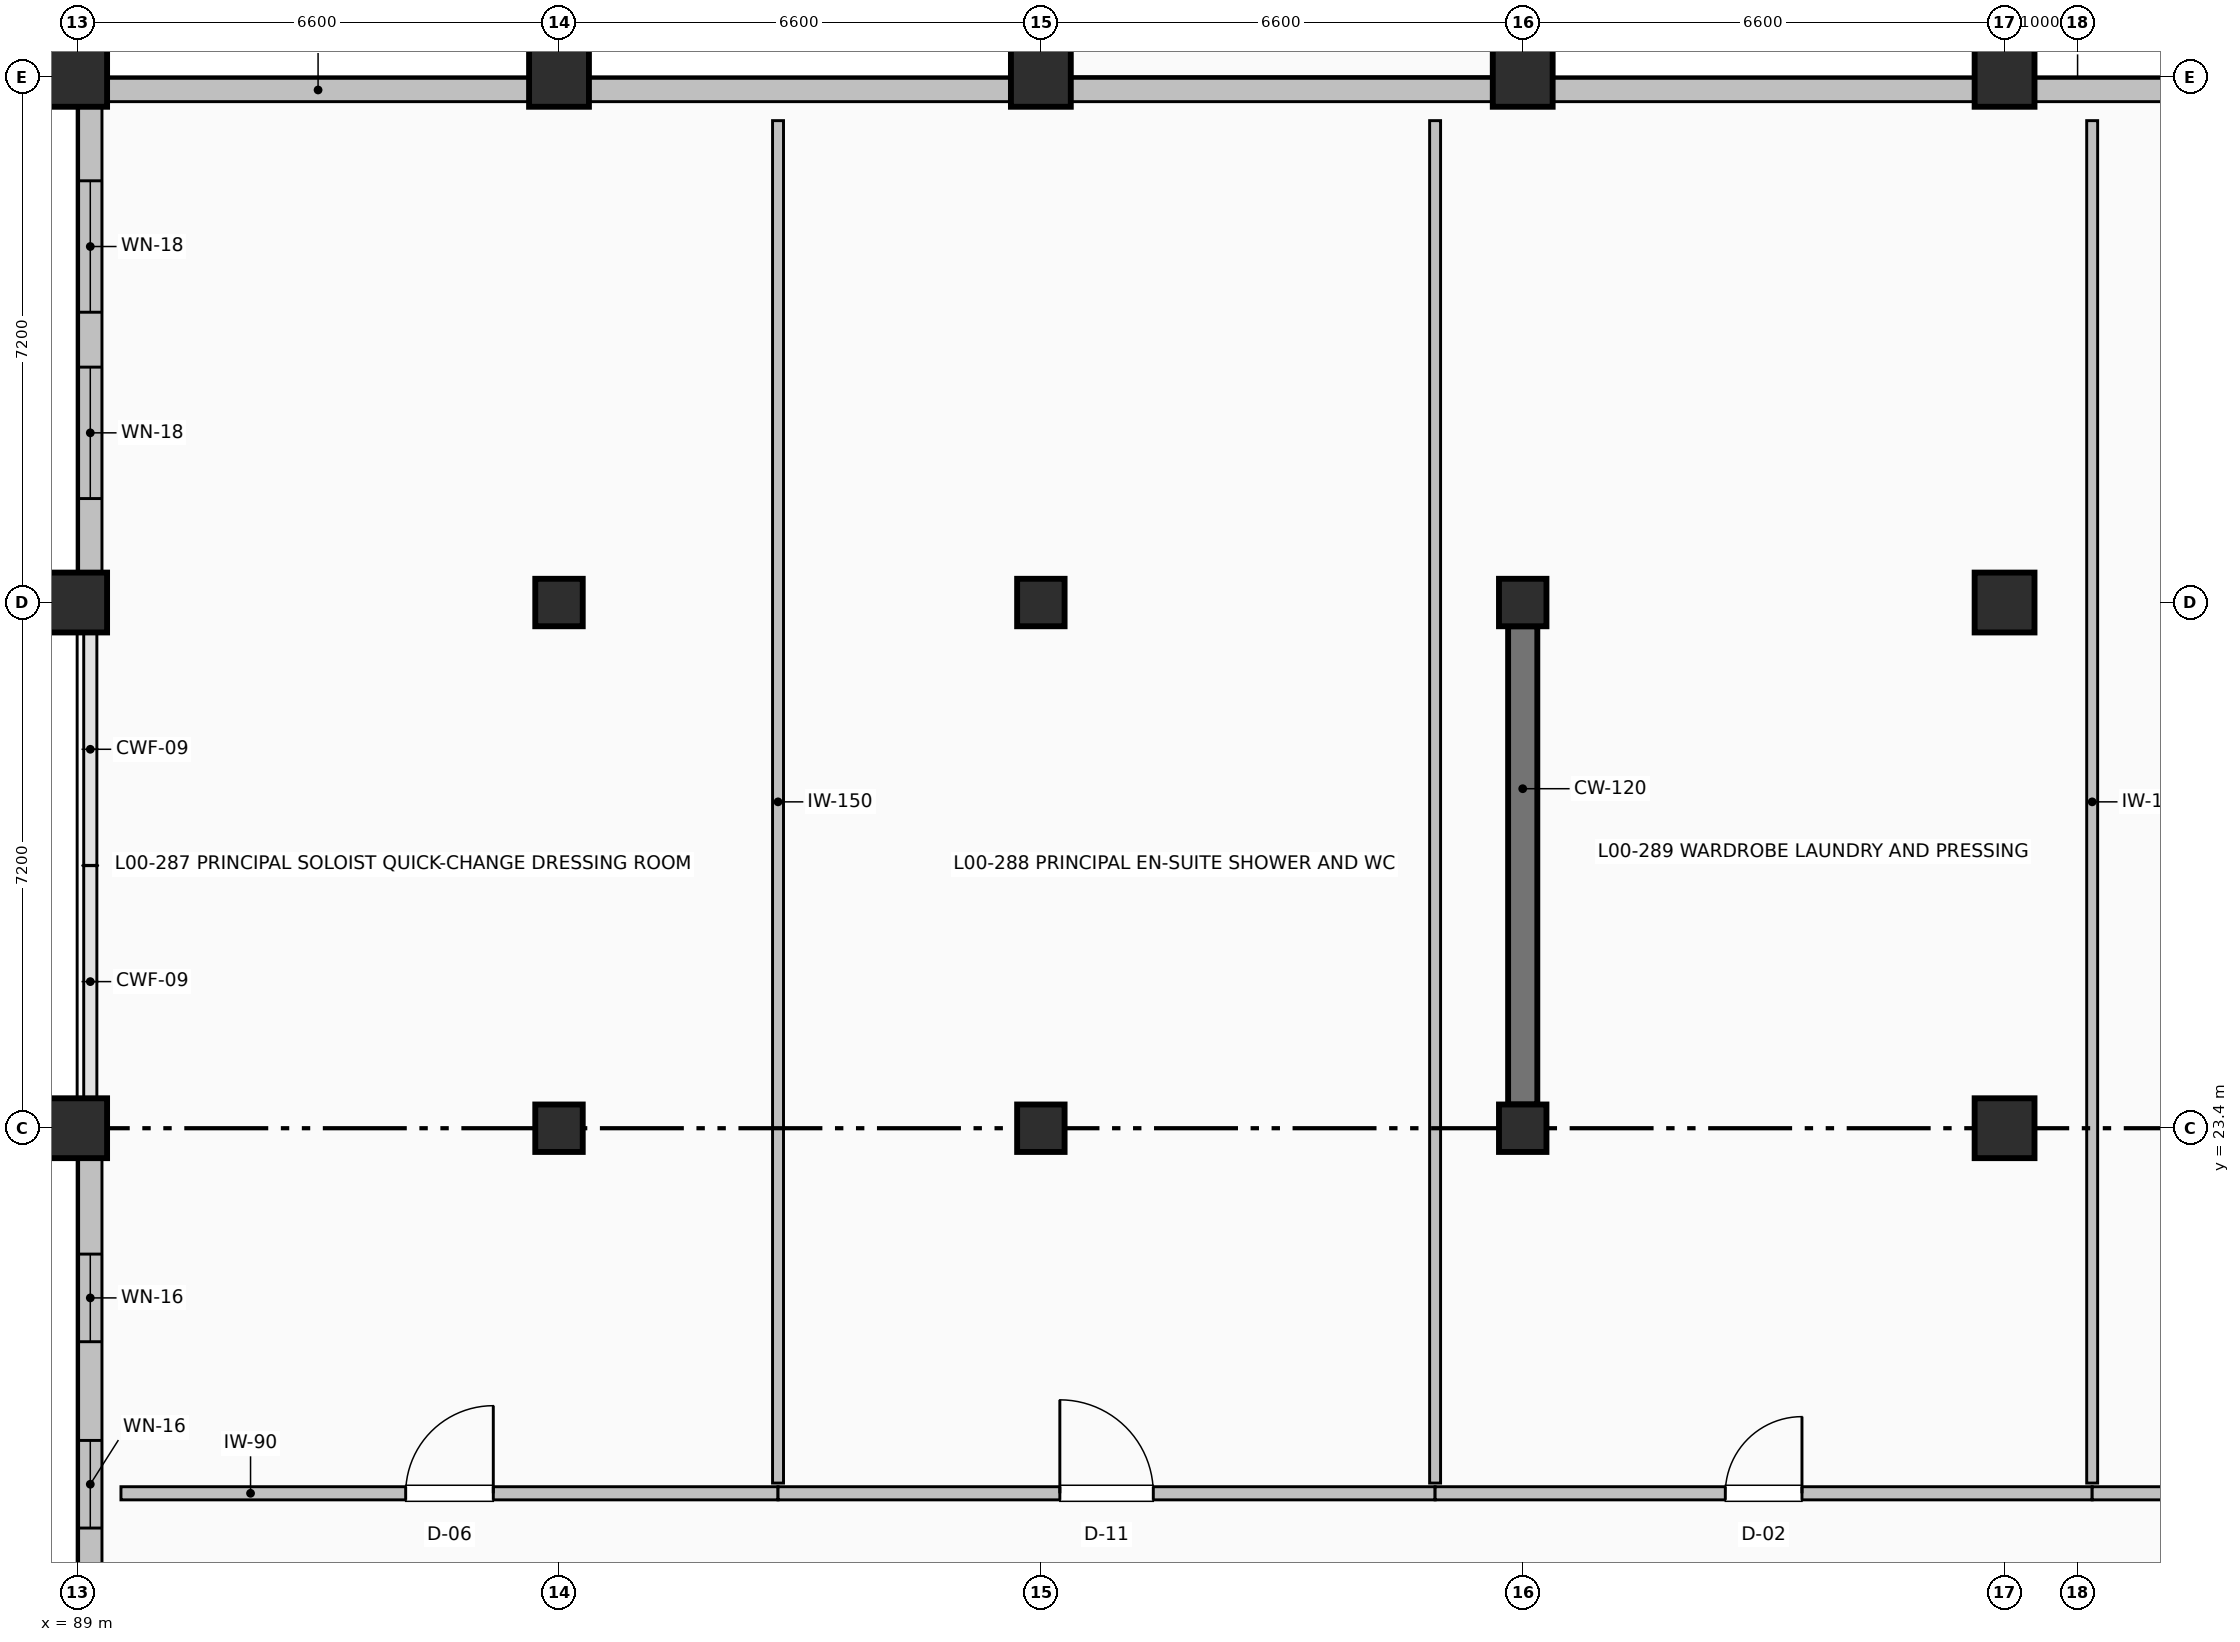
"""IFC4 building model, lengths in metres.
Left out: names, types, materials, properties, quantities, classifications, styles, units other than length and angle.
Written with IfcOpenShell. Run it as: python <this file> out.ifc"""

import sys

from ifc_helpers import new_model, si_unit, direction, frame, frame_2d, origin, origin_2d, place, context, subcontext, project, spatial, rectangle, extrude, element, fill, save


model = new_model("IFC4")
c1 = context("Model", 3, precision=1e-05, world=origin(), true_north=direction((0.0, 1.0)))
c2 = subcontext(c1, "Body", "Model", "MODEL_VIEW")
j1 = project(units=[si_unit("LENGTHUNIT", "METRE"), si_unit("PLANEANGLEUNIT", "RADIAN")], contexts=[c1])
p1 = place(None, origin())
s1 = spatial("IfcSite", under=j1, at=p1, CompositionType="ELEMENT")
p2 = place(p1, origin())
s2 = spatial("IfcBuilding", under=s1, at=p2, CompositionType="ELEMENT")
p3 = place(p2, origin())
s3 = spatial("IfcBuildingStorey", under=s2, at=p3, CompositionType="ELEMENT", Elevation=0.0)
for number, where, z_axis, x_axis in (
    (1, (89.0, 23.4, 0.0), (0.0, 0.0, 1.0), (1.0, 0.0, 0.0)),
    (2, (89.0, 30.6, 0.0), (0.0, 0.0, 1.0), (1.0, 0.0, 0.0)),
    (3, (89.0, 37.8, 0.0), (0.0, 0.0, 1.0), (1.0, 0.0, 0.0)),
):
    element("IfcColumn", number, at=place(p3, frame(where, z_axis=z_axis, x_axis=x_axis)), inside=s3, PredefinedType="COLUMN", context=c2, shape_type="SweptSolid", body=[
        extrude(rectangle(XDim=0.82, YDim=0.82, at=origin_2d()), origin(), (0.0, 0.0, 1.0), 5.4),
    ])
for number, where, z_axis, x_axis in (
    (4, (95.6, 23.4, 0.0), (0.0, 0.0, 1.0), (1.0, 0.0, 0.0)),
    (5, (95.6, 30.6, 0.0), (0.0, 0.0, 1.0), (1.0, 0.0, 0.0)),
):
    element("IfcColumn", number, at=place(p3, frame(where, z_axis=z_axis, x_axis=x_axis)), inside=s3, PredefinedType="COLUMN", context=c2, shape_type="SweptSolid", body=[
        extrude(rectangle(XDim=0.65, YDim=0.65, at=origin_2d()), origin(), (0.0, 0.0, 1.0), 5.4),
    ])
p4 = place(p3, frame((95.6, 37.8, 0.0), z_axis=(0.0, 0.0, 1.0), x_axis=(1.0, 0.0, 0.0)))
e6 = element("IfcColumn", 6, at=p4, inside=s3, PredefinedType="COLUMN", context=c2, shape_type="SweptSolid", body=[
    extrude(rectangle(XDim=0.82, YDim=0.82, at=origin_2d()), origin(), (0.0, 0.0, 1.0), 5.4),
])
for number, where, z_axis, x_axis in (
    (7, (102.2, 23.4, 0.0), (0.0, 0.0, 1.0), (1.0, 0.0, 0.0)),
    (8, (102.2, 30.6, 0.0), (0.0, 0.0, 1.0), (1.0, 0.0, 0.0)),
):
    element("IfcColumn", number, at=place(p3, frame(where, z_axis=z_axis, x_axis=x_axis)), inside=s3, PredefinedType="COLUMN", context=c2, shape_type="SweptSolid", body=[
        extrude(rectangle(XDim=0.65, YDim=0.65, at=origin_2d()), origin(), (0.0, 0.0, 1.0), 5.4),
    ])
p5 = place(p3, frame((102.2, 37.8, 0.0), z_axis=(0.0, 0.0, 1.0), x_axis=(1.0, 0.0, 0.0)))
e9 = element("IfcColumn", 9, at=p5, inside=s3, PredefinedType="COLUMN", context=c2, shape_type="SweptSolid", body=[
    extrude(rectangle(XDim=0.82, YDim=0.82, at=origin_2d()), origin(), (0.0, 0.0, 1.0), 5.4),
])
for number, where, z_axis, x_axis in (
    (10, (108.8, 23.4, 0.0), (0.0, 0.0, 1.0), (1.0, 0.0, 0.0)),
    (11, (108.8, 30.6, 0.0), (0.0, 0.0, 1.0), (1.0, 0.0, 0.0)),
):
    element("IfcColumn", number, at=place(p3, frame(where, z_axis=z_axis, x_axis=x_axis)), inside=s3, PredefinedType="COLUMN", context=c2, shape_type="SweptSolid", body=[
        extrude(rectangle(XDim=0.65, YDim=0.65, at=origin_2d()), origin(), (0.0, 0.0, 1.0), 5.4),
    ])
for number, where, z_axis, x_axis in (
    (12, (108.8, 37.8, 0.0), (0.0, 0.0, 1.0), (1.0, 0.0, 0.0)),
    (13, (115.4, 23.4, 0.0), (0.0, 0.0, 1.0), (1.0, 0.0, 0.0)),
    (14, (115.4, 30.6, 0.0), (0.0, 0.0, 1.0), (1.0, 0.0, 0.0)),
    (15, (115.4, 37.8, 0.0), (0.0, 0.0, 1.0), (1.0, 0.0, 0.0)),
):
    element("IfcColumn", number, at=place(p3, frame(where, z_axis=z_axis, x_axis=x_axis)), inside=s3, PredefinedType="COLUMN", context=c2, shape_type="SweptSolid", body=[
        extrude(rectangle(XDim=0.82, YDim=0.82, at=origin_2d()), origin(), (0.0, 0.0, 1.0), 5.4),
    ])
p6 = place(p3, frame((108.8, 23.725, 0.0), z_axis=(0.0, 0.0, 1.0), x_axis=(0.0, 1.0, 0.0)))
e16 = element("IfcWall", 16, at=p6, inside=s3, PredefinedType="SHEAR", context=c2, shape_type="SweptSolid", body=[
    extrude(rectangle(XDim=6.55, YDim=0.4, at=frame_2d((3.275, 0.0))), origin(), (0.0, 0.0, 1.0), 5.08),
])
p7 = place(p3, frame((89.18, 16.61, 0.0), z_axis=(0.0, 0.0, 1.0), x_axis=(0.0, 1.0, 0.0)))
e17 = element("IfcWall", 17, at=p7, inside=s3, PredefinedType="SOLIDWALL", context=c2, shape_type="SweptSolid", body=[
    extrude(rectangle(XDim=6.38, YDim=0.32, at=frame_2d((3.19, 0.0))), origin(), (0.0, 0.0, 1.0), 4.342),
])
p8 = place(p7, frame((1.314, 0.0, 1.0)))
e18 = element("IfcOpeningElement", 18, at=p8, cuts=e17, PredefinedType="OPENING", context=c2, shape_type="SweptSolid", body=[
    extrude(rectangle(XDim=1.2, YDim=1.7, at=frame_2d((0.6, 0.85))), frame((0.0, 0.17, 0.0), z_axis=(0.0, -1.0, 0.0), x_axis=(1.0, 0.0, 0.0)), (0.0, 0.0, 1.0), 0.34),
])
p9 = place(p7, frame((3.866, 0.0, 1.0)))
e19 = element("IfcOpeningElement", 19, at=p9, cuts=e17, PredefinedType="OPENING", context=c2, shape_type="SweptSolid", body=[
    extrude(rectangle(XDim=1.2, YDim=1.7, at=frame_2d((0.6, 0.85))), frame((0.0, 0.17, 0.0), z_axis=(0.0, -1.0, 0.0), x_axis=(1.0, 0.0, 0.0)), (0.0, 0.0, 1.0), 0.34),
])
p10 = place(p3, frame((89.18, 31.01, 0.0), z_axis=(0.0, 0.0, 1.0), x_axis=(0.0, 1.0, 0.0)))
e20 = element("IfcWall", 20, at=p10, inside=s3, PredefinedType="SOLIDWALL", context=c2, shape_type="SweptSolid", body=[
    extrude(rectangle(XDim=6.38, YDim=0.32, at=frame_2d((3.19, 0.0))), origin(), (0.0, 0.0, 1.0), 4.342),
])
p11 = place(p10, frame((1.014, 0.0, 1.0)))
e21 = element("IfcOpeningElement", 21, at=p11, cuts=e20, PredefinedType="OPENING", context=c2, shape_type="SweptSolid", body=[
    extrude(rectangle(XDim=1.8, YDim=1.7, at=frame_2d((0.9, 0.85))), frame((0.0, 0.17, 0.0), z_axis=(0.0, -1.0, 0.0), x_axis=(1.0, 0.0, 0.0)), (0.0, 0.0, 1.0), 0.34),
])
p12 = place(p10, frame((3.566, 0.0, 1.0)))
e22 = element("IfcOpeningElement", 22, at=p12, cuts=e20, PredefinedType="OPENING", context=c2, shape_type="SweptSolid", body=[
    extrude(rectangle(XDim=1.8, YDim=1.7, at=frame_2d((0.9, 0.85))), frame((0.0, 0.17, 0.0), z_axis=(0.0, -1.0, 0.0), x_axis=(1.0, 0.0, 0.0)), (0.0, 0.0, 1.0), 0.34),
])
for number, where, z_axis, x_axis in (
    (23, (89.41, 37.62, 0.0), (0.0, 0.0, 1.0), (1.0, 0.0, 0.0)),
    (24, (96.01, 37.62, 0.0), (0.0, 0.0, 1.0), (1.0, 0.0, 0.0)),
):
    element("IfcWall", number, at=place(p3, frame(where, z_axis=z_axis, x_axis=x_axis)), inside=s3, PredefinedType="SOLIDWALL", context=c2, shape_type="SweptSolid", body=[
        extrude(rectangle(XDim=5.78, YDim=0.32, at=frame_2d((2.89, 0.0))), origin(), (0.0, 0.0, 1.0), 4.342),
    ])
p13 = place(p3, frame((102.61, 37.62, 0.0), z_axis=(0.0, 0.0, 1.0), x_axis=(1.0, 0.0, 0.0)))
e25 = element("IfcWall", 25, at=p13, inside=s3, PredefinedType="SOLIDWALL", context=c2, shape_type="SweptSolid", body=[
    extrude(rectangle(XDim=5.78, YDim=0.32, at=frame_2d((2.89, 0.0))), origin(), (0.0, 0.0, 1.0), 4.342),
])
for number, where, z_axis, x_axis in (
    (26, (109.21, 37.62, 0.0), (0.0, 0.0, 1.0), (1.0, 0.0, 0.0)),
    (27, (115.81, 37.62, 0.0), (0.0, 0.0, 1.0), (1.0, 0.0, 0.0)),
):
    element("IfcWall", number, at=place(p3, frame(where, z_axis=z_axis, x_axis=x_axis)), inside=s3, PredefinedType="SOLIDWALL", context=c2, shape_type="SweptSolid", body=[
        extrude(rectangle(XDim=5.78, YDim=0.32, at=frame_2d((2.89, 0.0))), origin(), (0.0, 0.0, 1.0), 4.342),
    ])
p14 = place(p3, frame((89.6, 18.4, 0.0), z_axis=(0.0, 0.0, 1.0), x_axis=(1.0, 0.0, 0.0)))
e28 = element("IfcWall", 28, at=p14, inside=s3, PredefinedType="PARTITIONING", context=c2, shape_type="SweptSolid", body=[
    extrude(rectangle(XDim=9.0, YDim=0.18, at=frame_2d((4.5, 0.0))), origin(), (0.0, 0.0, 1.0), 5.092),
])
p15 = place(p14, frame((3.9, 0.0, 0.0)))
e29 = element("IfcOpeningElement", 29, at=p15, cuts=e28, PredefinedType="OPENING", context=c2, shape_type="SweptSolid", body=[
    extrude(rectangle(XDim=1.2, YDim=2.1, at=frame_2d((0.6, 1.05))), frame((0.0, 0.1, 0.0), z_axis=(0.0, -1.0, 0.0), x_axis=(1.0, 0.0, 0.0)), (0.0, 0.0, 1.0), 0.2),
])
p16 = place(p3, frame((98.6, 18.54, 0.0), z_axis=(0.0, 0.0, 1.0), x_axis=(0.0, 1.0, 0.0)))
e30 = element("IfcWall", 30, at=p16, inside=s3, PredefinedType="PARTITIONING", context=c2, shape_type="SweptSolid", body=[
    extrude(rectangle(XDim=18.66, YDim=0.15, at=frame_2d((9.33, 0.0))), origin(), (0.0, 0.0, 1.0), 5.092),
])
p17 = place(p3, frame((98.6, 18.4, 0.0), z_axis=(0.0, 0.0, 1.0), x_axis=(1.0, 0.0, 0.0)))
e31 = element("IfcWall", 31, at=p17, inside=s3, PredefinedType="PARTITIONING", context=c2, shape_type="SweptSolid", body=[
    extrude(rectangle(XDim=9.0, YDim=0.18, at=frame_2d((4.5, 0.0))), origin(), (0.0, 0.0, 1.0), 5.092),
])
p18 = place(p17, frame((3.86, 0.0, 0.0)))
e32 = element("IfcOpeningElement", 32, at=p18, cuts=e31, PredefinedType="OPENING", context=c2, shape_type="SweptSolid", body=[
    extrude(rectangle(XDim=1.28, YDim=2.14, at=frame_2d((0.64, 1.07))), frame((0.0, 0.1, 0.0), z_axis=(0.0, -1.0, 0.0), x_axis=(1.0, 0.0, 0.0)), (0.0, 0.0, 1.0), 0.2),
])
p19 = place(p3, frame((107.6, 18.54, 0.0), z_axis=(0.0, 0.0, 1.0), x_axis=(0.0, 1.0, 0.0)))
e33 = element("IfcWall", 33, at=p19, inside=s3, PredefinedType="PARTITIONING", context=c2, shape_type="SweptSolid", body=[
    extrude(rectangle(XDim=18.66, YDim=0.15, at=frame_2d((9.33, 0.0))), origin(), (0.0, 0.0, 1.0), 5.092),
])
p20 = place(p3, frame((107.6, 18.4, 0.0), z_axis=(0.0, 0.0, 1.0), x_axis=(1.0, 0.0, 0.0)))
e34 = element("IfcWall", 34, at=p20, inside=s3, PredefinedType="PARTITIONING", context=c2, shape_type="SweptSolid", body=[
    extrude(rectangle(XDim=9.0, YDim=0.18, at=frame_2d((4.5, 0.0))), origin(), (0.0, 0.0, 1.0), 5.092),
])
p21 = place(p20, frame((3.975, 0.0, 0.0)))
e35 = element("IfcOpeningElement", 35, at=p21, cuts=e34, PredefinedType="OPENING", context=c2, shape_type="SweptSolid", body=[
    extrude(rectangle(XDim=1.05, YDim=2.1, at=frame_2d((0.525, 1.05))), frame((0.0, 0.1, 0.0), z_axis=(0.0, -1.0, 0.0), x_axis=(1.0, 0.0, 0.0)), (0.0, 0.0, 1.0), 0.2),
])
p22 = place(p3, frame((116.6, 18.54, 0.0), z_axis=(0.0, 0.0, 1.0), x_axis=(0.0, 1.0, 0.0)))
e36 = element("IfcWall", 36, at=p22, inside=s3, PredefinedType="PARTITIONING", context=c2, shape_type="SweptSolid", body=[
    extrude(rectangle(XDim=18.66, YDim=0.15, at=frame_2d((9.33, 0.0))), origin(), (0.0, 0.0, 1.0), 5.092),
])
p23 = place(p3, frame((116.6, 18.4, 0.0), z_axis=(0.0, 0.0, 1.0), x_axis=(1.0, 0.0, 0.0)))
e37 = element("IfcWall", 37, at=p23, inside=s3, PredefinedType="PARTITIONING", context=c2, shape_type="SweptSolid", body=[
    extrude(rectangle(XDim=9.0, YDim=0.18, at=frame_2d((4.5, 0.0))), origin(), (0.0, 0.0, 1.0), 5.092),
])
p24 = place(p23, frame((3.94, 0.0, 0.0)))
e38 = element("IfcOpeningElement", 38, at=p24, cuts=e37, PredefinedType="OPENING", context=c2, shape_type="SweptSolid", body=[
    extrude(rectangle(XDim=1.12, YDim=2.12, at=frame_2d((0.56, 1.06))), frame((0.0, 0.1, 0.0), z_axis=(0.0, -1.0, 0.0), x_axis=(1.0, 0.0, 0.0)), (0.0, 0.0, 1.0), 0.2),
])
p25 = place(p8, origin())
e39 = element("IfcWindow", 39, at=p25, inside=s3, PartitioningType="SINGLE_PANEL", PredefinedType="WINDOW", context=c2, shape_type="SweptSolid", body=[
    extrude(rectangle(XDim=1.2, YDim=1.7, at=frame_2d((0.6, 0.85))), frame((0.0, 0.03, 0.0), z_axis=(0.0, -1.0, 0.0), x_axis=(1.0, 0.0, 0.0)), (0.0, 0.0, 1.0), 0.06),
])
fill(e18, e39)
p26 = place(p9, origin())
e40 = element("IfcWindow", 40, at=p26, inside=s3, PartitioningType="SINGLE_PANEL", PredefinedType="WINDOW", context=c2, shape_type="SweptSolid", body=[
    extrude(rectangle(XDim=1.2, YDim=1.7, at=frame_2d((0.6, 0.85))), frame((0.0, 0.03, 0.0), z_axis=(0.0, -1.0, 0.0), x_axis=(1.0, 0.0, 0.0)), (0.0, 0.0, 1.0), 0.06),
])
fill(e19, e40)
p27 = place(p11, origin())
e41 = element("IfcWindow", 41, at=p27, inside=s3, PartitioningType="SINGLE_PANEL", PredefinedType="WINDOW", context=c2, shape_type="SweptSolid", body=[
    extrude(rectangle(XDim=1.8, YDim=1.7, at=frame_2d((0.9, 0.85))), frame((0.0, 0.03, 0.0), z_axis=(0.0, -1.0, 0.0), x_axis=(1.0, 0.0, 0.0)), (0.0, 0.0, 1.0), 0.06),
])
fill(e21, e41)
p28 = place(p12, origin())
e42 = element("IfcWindow", 42, at=p28, inside=s3, PartitioningType="SINGLE_PANEL", PredefinedType="WINDOW", context=c2, shape_type="SweptSolid", body=[
    extrude(rectangle(XDim=1.8, YDim=1.7, at=frame_2d((0.9, 0.85))), frame((0.0, 0.03, 0.0), z_axis=(0.0, -1.0, 0.0), x_axis=(1.0, 0.0, 0.0)), (0.0, 0.0, 1.0), 0.06),
])
fill(e22, e42)
p29 = place(p15, origin())
e43 = element("IfcDoor", 43, at=p29, inside=s3, OperationType="SINGLE_SWING_RIGHT", PredefinedType="DOOR", context=c2, shape_type="SweptSolid", body=[
    extrude(rectangle(XDim=1.2, YDim=2.1, at=frame_2d((0.6, 1.05))), frame((0.0, 0.025, 0.0), z_axis=(0.0, -1.0, 0.0), x_axis=(1.0, 0.0, 0.0)), (0.0, 0.0, 1.0), 0.05),
])
fill(e29, e43)
p30 = place(p18, origin())
e44 = element("IfcDoor", 44, at=p30, inside=s3, OperationType="SINGLE_SWING_LEFT", PredefinedType="DOOR", context=c2, shape_type="SweptSolid", body=[
    extrude(rectangle(XDim=1.28, YDim=2.14, at=frame_2d((0.64, 1.07))), frame((0.0, 0.025, 0.0), z_axis=(0.0, -1.0, 0.0), x_axis=(1.0, 0.0, 0.0)), (0.0, 0.0, 1.0), 0.05),
])
fill(e32, e44)
p31 = place(p21, origin())
e45 = element("IfcDoor", 45, at=p31, inside=s3, OperationType="SINGLE_SWING_RIGHT", PredefinedType="DOOR", context=c2, shape_type="SweptSolid", body=[
    extrude(rectangle(XDim=1.05, YDim=2.1, at=frame_2d((0.525, 1.05))), frame((0.0, 0.025, 0.0), z_axis=(0.0, -1.0, 0.0), x_axis=(1.0, 0.0, 0.0)), (0.0, 0.0, 1.0), 0.05),
])
fill(e35, e45)
save(model, sys.argv[1])
